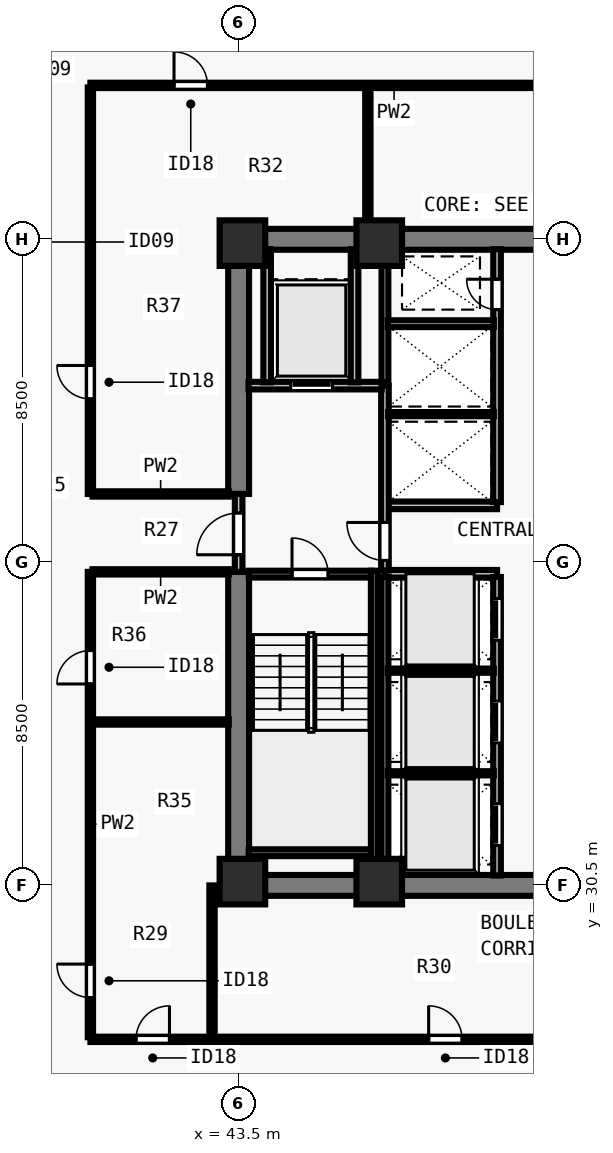
"""IFC4 building model, lengths in metres.
Left out: names, types, materials, properties, quantities, classifications, styles, units other than length and angle.
Written with IfcOpenShell. Run it as: python <this file> out.ifc"""

import sys

from ifc_helpers import new_model, si_unit, direction, frame, frame_2d, origin, origin_2d, place, context, subcontext, project, spatial, rectangle, extrude, element, fill, save


model = new_model("IFC4")
c1 = context("Model", 3, precision=1e-05, world=origin(), true_north=direction((0.0, 1.0)))
c2 = subcontext(c1, "Body", "Model", "MODEL_VIEW")
j1 = project(units=[si_unit("LENGTHUNIT", "METRE"), si_unit("PLANEANGLEUNIT", "RADIAN")], contexts=[c1])
p1 = place(None, origin())
s1 = spatial("IfcSite", under=j1, at=p1, CompositionType="ELEMENT")
p2 = place(p1, origin())
s2 = spatial("IfcBuilding", under=s1, at=p2, CompositionType="ELEMENT")
p3 = place(p2, frame((0.0, 0.0, 90.0)))
s3 = spatial("IfcBuildingStorey", under=s2, at=p3, CompositionType="ELEMENT", Elevation=90.0)
for number, where, z_axis, x_axis in (
    (1, (43.6, 30.6, 0.0), (0.0, 0.0, 1.0), (1.0, 0.0, 0.0)),
    (2, (47.2, 30.6, 0.0), (0.0, 0.0, 1.0), (1.0, 0.0, 0.0)),
    (3, (43.6, 47.4, 0.0), (0.0, 0.0, 1.0), (1.0, 0.0, 0.0)),
    (4, (47.2, 47.4, 0.0), (0.0, 0.0, 1.0), (1.0, 0.0, 0.0)),
):
    element("IfcColumn", number, at=place(p3, frame(where, z_axis=z_axis, x_axis=x_axis)), inside=s3, PredefinedType="COLUMN", context=c2, shape_type="SweptSolid", body=[
        extrude(rectangle(XDim=1.2, YDim=1.2, at=origin_2d()), origin(), (0.0, 0.0, 1.0), 3.5),
    ])
for number, where, z_axis, x_axis in (
    (5, (43.225, 30.5, 0.0), (0.0, 0.0, 1.0), (1.0, 0.0, 0.0)),
    (6, (43.225, 47.5, 0.0), (0.0, 0.0, 1.0), (1.0, 0.0, 0.0)),
):
    element("IfcWall", number, at=place(p3, frame(where, z_axis=z_axis, x_axis=x_axis)), inside=s3, PredefinedType="SHEAR", context=c2, shape_type="SweptSolid", body=[
        extrude(rectangle(XDim=17.55, YDim=0.55, at=frame_2d((8.775, 0.0))), origin(), (0.0, 0.0, 1.0), 3.28),
    ])
p4 = place(p3, frame((43.5, 30.765, 0.0), z_axis=(0.0, 0.0, 1.0), x_axis=(0.0, 1.0, 0.0)))
e7 = element("IfcWall", 7, at=p4, inside=s3, PredefinedType="SHEAR", context=c2, shape_type="SweptSolid", body=[
    extrude(rectangle(XDim=7.985, YDim=0.55, at=frame_2d((3.993, 0.0))), origin(), (0.0, 0.0, 1.0), 3.28),
])
p5 = place(p3, frame((43.5, 40.8, 0.0), z_axis=(0.0, 0.0, 1.0), x_axis=(0.0, 1.0, 0.0)))
e8 = element("IfcWall", 8, at=p5, inside=s3, PredefinedType="SHEAR", context=c2, shape_type="SweptSolid", body=[
    extrude(rectangle(XDim=6.435, YDim=0.55, at=frame_2d((3.218, 0.0))), origin(), (0.0, 0.0, 1.0), 3.28),
])
for number, where, z_axis, x_axis in (
    (9, (47.35, 38.7, 0.0), (0.0, 0.0, 1.0), (1.0, 0.0, 0.0)),
    (10, (47.35, 40.5, 0.0), (0.0, 0.0, 1.0), (1.0, 0.0, 0.0)),
):
    element("IfcWall", number, at=place(p3, frame(where, z_axis=z_axis, x_axis=x_axis)), inside=s3, PredefinedType="SOLIDWALL", context=c2, shape_type="SweptSolid", body=[
        extrude(rectangle(XDim=2.95, YDim=0.2, at=frame_2d((1.475, 0.0))), origin(), (0.0, 0.0, 1.0), 3.28),
    ])
p6 = place(p3, frame((50.3, 30.76, 0.0), z_axis=(0.0, 0.0, 1.0), x_axis=(0.0, 1.0, 0.0)))
e11 = element("IfcWall", 11, at=p6, inside=s3, PredefinedType="SOLIDWALL", context=c2, shape_type="SweptSolid", body=[
    extrude(rectangle(XDim=7.855, YDim=0.2, at=frame_2d((3.927, 0.0))), origin(), (0.0, 0.0, 1.0), 3.28),
])
p7 = place(p6, frame((0.79, 0.0, 0.0)))
e12 = element("IfcOpeningElement", 12, at=p7, cuts=e11, PredefinedType="OPENING", context=c2, shape_type="SweptSolid", body=[
    extrude(rectangle(XDim=1.1, YDim=2.2, at=frame_2d((0.55, 1.1))), frame((0.0, 0.11, 0.0), z_axis=(0.0, -1.0, 0.0), x_axis=(1.0, 0.0, 0.0)), (0.0, 0.0, 1.0), 0.22),
])
p8 = place(p6, frame((3.49, 0.0, 0.0)))
e13 = element("IfcOpeningElement", 13, at=p8, cuts=e11, PredefinedType="OPENING", context=c2, shape_type="SweptSolid", body=[
    extrude(rectangle(XDim=1.1, YDim=2.2, at=frame_2d((0.55, 1.1))), frame((0.0, 0.11, 0.0), z_axis=(0.0, -1.0, 0.0), x_axis=(1.0, 0.0, 0.0)), (0.0, 0.0, 1.0), 0.22),
])
p9 = place(p6, frame((6.19, 0.0, 0.0)))
e14 = element("IfcOpeningElement", 14, at=p9, cuts=e11, PredefinedType="OPENING", context=c2, shape_type="SweptSolid", body=[
    extrude(rectangle(XDim=1.1, YDim=2.2, at=frame_2d((0.55, 1.1))), frame((0.0, 0.11, 0.0), z_axis=(0.0, -1.0, 0.0), x_axis=(1.0, 0.0, 0.0)), (0.0, 0.0, 1.0), 0.22),
])
p10 = place(p3, frame((50.3, 40.585, 0.0), z_axis=(0.0, 0.0, 1.0), x_axis=(0.0, 1.0, 0.0)))
e15 = element("IfcWall", 15, at=p10, inside=s3, PredefinedType="SOLIDWALL", context=c2, shape_type="SweptSolid", body=[
    extrude(rectangle(XDim=6.655, YDim=0.2, at=frame_2d((3.328, 0.0))), origin(), (0.0, 0.0, 1.0), 3.28),
])
p11 = place(p10, frame((5.065, 0.0, 0.0)))
e16 = element("IfcOpeningElement", 16, at=p11, cuts=e15, PredefinedType="OPENING", context=c2, shape_type="SweptSolid", body=[
    extrude(rectangle(XDim=0.8, YDim=2.08, at=frame_2d((0.4, 1.04))), frame((0.0, 0.11, 0.0), z_axis=(0.0, -1.0, 0.0), x_axis=(1.0, 0.0, 0.0)), (0.0, 0.0, 1.0), 0.22),
])
p12 = place(p3, frame((43.5, 38.75, 0.0), z_axis=(0.0, 0.0, 1.0), x_axis=(0.0, 1.0, 0.0)))
e17 = element("IfcWall", 17, at=p12, inside=s3, PredefinedType="SOLIDWALL", context=c2, shape_type="SweptSolid", body=[
    extrude(rectangle(XDim=2.05, YDim=0.2, at=frame_2d((1.025, 0.0))), origin(), (0.0, 0.0, 1.0), 3.28),
])
p13 = place(p12, frame((0.45, 0.0, 0.0)))
e18 = element("IfcOpeningElement", 18, at=p13, cuts=e17, PredefinedType="OPENING", context=c2, shape_type="SweptSolid", body=[
    extrude(rectangle(XDim=1.1, YDim=2.15, at=frame_2d((0.55, 1.075))), frame((0.0, 0.11, 0.0), z_axis=(0.0, -1.0, 0.0), x_axis=(1.0, 0.0, 0.0)), (0.0, 0.0, 1.0), 0.22),
])
p14 = place(p3, frame((47.35, 38.785, 0.0), z_axis=(0.0, 0.0, 1.0), x_axis=(0.0, 1.0, 0.0)))
e19 = element("IfcWall", 19, at=p14, inside=s3, PredefinedType="SOLIDWALL", context=c2, shape_type="SweptSolid", body=[
    extrude(rectangle(XDim=4.865, YDim=0.2, at=frame_2d((2.433, 0.0))), origin(), (0.0, 0.0, 1.0), 3.28),
])
p15 = place(p14, frame((0.265, 0.0, 0.0)))
e20 = element("IfcOpeningElement", 20, at=p15, cuts=e19, PredefinedType="OPENING", context=c2, shape_type="SweptSolid", body=[
    extrude(rectangle(XDim=1.0, YDim=2.15, at=frame_2d((0.5, 1.075))), frame((0.0, 0.11, 0.0), z_axis=(0.0, -1.0, 0.0), x_axis=(1.0, 0.0, 0.0)), (0.0, 0.0, 1.0), 0.22),
])
p16 = place(p3, frame((43.76, 43.65, 0.0), z_axis=(0.0, 0.0, 1.0), x_axis=(1.0, 0.0, 0.0)))
e21 = element("IfcWall", 21, at=p16, inside=s3, PredefinedType="SOLIDWALL", context=c2, shape_type="SweptSolid", body=[
    extrude(rectangle(XDim=3.505, YDim=0.2, at=frame_2d((1.752, 0.0))), origin(), (0.0, 0.0, 1.0), 3.28),
])
p17 = place(p16, frame((1.11, 0.0, 0.0)))
e22 = element("IfcOpeningElement", 22, at=p17, cuts=e21, PredefinedType="OPENING", context=c2, shape_type="SweptSolid", body=[
    extrude(rectangle(XDim=1.1, YDim=2.2, at=frame_2d((0.55, 1.1))), frame((0.0, 0.11, 0.0), z_axis=(0.0, -1.0, 0.0), x_axis=(1.0, 0.0, 0.0)), (0.0, 0.0, 1.0), 0.22),
])
for number, where, z_axis, x_axis in (
    (23, (46.55, 43.735, 0.0), (0.0, 0.0, 1.0), (0.0, 1.0, 0.0)),
    (24, (44.25, 43.735, 0.0), (0.0, 0.0, 1.0), (0.0, 1.0, 0.0)),
):
    element("IfcWall", number, at=place(p3, frame(where, z_axis=z_axis, x_axis=x_axis)), inside=s3, PredefinedType="SOLIDWALL", context=c2, shape_type="SweptSolid", body=[
        extrude(rectangle(XDim=3.505, YDim=0.2, at=frame_2d((1.752, 0.0))), origin(), (0.0, 0.0, 1.0), 3.28),
    ])
p18 = place(p3, frame((47.35, 30.76, 0.0), z_axis=(0.0, 0.0, 1.0), x_axis=(0.0, 1.0, 0.0)))
e25 = element("IfcWall", 25, at=p18, inside=s3, PredefinedType="SOLIDWALL", context=c2, shape_type="SweptSolid", body=[
    extrude(rectangle(XDim=7.855, YDim=0.18, at=frame_2d((3.927, 0.0))), origin(), (0.0, 0.0, 1.0), 3.28),
])
for number, where, z_axis, x_axis in (
    (26, (47.425, 33.45, 0.0), (0.0, 0.0, 1.0), (1.0, 0.0, 0.0)),
    (27, (47.425, 36.15, 0.0), (0.0, 0.0, 1.0), (1.0, 0.0, 0.0)),
):
    element("IfcWall", number, at=place(p3, frame(where, z_axis=z_axis, x_axis=x_axis)), inside=s3, PredefinedType="PARTITIONING", context=c2, shape_type="SweptSolid", body=[
        extrude(rectangle(XDim=2.79, YDim=0.11, at=frame_2d((1.395, 0.0))), origin(), (0.0, 0.0, 1.0), 3.28),
    ])
p19 = place(p3, frame((47.35, 43.735, 0.0), z_axis=(0.0, 0.0, 1.0), x_axis=(0.0, 1.0, 0.0)))
e28 = element("IfcWall", 28, at=p19, inside=s3, PredefinedType="SOLIDWALL", context=c2, shape_type="SweptSolid", body=[
    extrude(rectangle(XDim=3.505, YDim=0.18, at=frame_2d((1.752, 0.0))), origin(), (0.0, 0.0, 1.0), 3.28),
])
p20 = place(p3, frame((47.435, 42.9, 0.0), z_axis=(0.0, 0.0, 1.0), x_axis=(1.0, 0.0, 0.0)))
e29 = element("IfcWall", 29, at=p20, inside=s3, PredefinedType="PARTITIONING", context=c2, shape_type="SweptSolid", body=[
    extrude(rectangle(XDim=2.78, YDim=0.11, at=frame_2d((1.39, 0.0))), origin(), (0.0, 0.0, 1.0), 3.28),
])
p21 = place(p3, frame((47.425, 45.28, 0.0), z_axis=(0.0, 0.0, 1.0), x_axis=(1.0, 0.0, 0.0)))
e30 = element("IfcWall", 30, at=p21, inside=s3, PredefinedType="SOLIDWALL", context=c2, shape_type="SweptSolid", body=[
    extrude(rectangle(XDim=2.79, YDim=0.18, at=frame_2d((1.395, 0.0))), origin(), (0.0, 0.0, 1.0), 3.28),
])
p22 = place(p3, frame((39.6, 26.45, 0.0), z_axis=(0.0, 0.0, 1.0), x_axis=(1.0, 0.0, 0.0)))
e31 = element("IfcWall", 31, at=p22, inside=s3, PredefinedType="PARTITIONING", context=c2, shape_type="SweptSolid", body=[
    extrude(rectangle(XDim=24.8, YDim=0.14, at=frame_2d((12.4, 0.0))), origin(), (0.0, 0.0, 1.0), 3.28),
])
p23 = place(p22, frame((1.2, 0.0, 0.0)))
e32 = element("IfcOpeningElement", 32, at=p23, cuts=e31, PredefinedType="OPENING", context=c2, shape_type="SweptSolid", body=[
    extrude(rectangle(XDim=0.88, YDim=2.1, at=frame_2d((0.44, 1.05))), frame((0.0, 0.08, 0.0), z_axis=(0.0, -1.0, 0.0), x_axis=(1.0, 0.0, 0.0)), (0.0, 0.0, 1.0), 0.16),
])
p24 = place(p22, frame((8.9, 0.0, 0.0)))
e33 = element("IfcOpeningElement", 33, at=p24, cuts=e31, PredefinedType="OPENING", context=c2, shape_type="SweptSolid", body=[
    extrude(rectangle(XDim=0.88, YDim=2.1, at=frame_2d((0.44, 1.05))), frame((0.0, 0.08, 0.0), z_axis=(0.0, -1.0, 0.0), x_axis=(1.0, 0.0, 0.0)), (0.0, 0.0, 1.0), 0.16),
])
p25 = place(p22, frame((19.4, 0.0, 0.0)))
e34 = element("IfcOpeningElement", 34, at=p25, cuts=e31, PredefinedType="OPENING", context=c2, shape_type="SweptSolid", body=[
    extrude(rectangle(XDim=0.88, YDim=2.1, at=frame_2d((0.44, 1.05))), frame((0.0, 0.08, 0.0), z_axis=(0.0, -1.0, 0.0), x_axis=(1.0, 0.0, 0.0)), (0.0, 0.0, 1.0), 0.16),
])
p26 = place(p3, frame((39.6, 51.55, 0.0), z_axis=(0.0, 0.0, 1.0), x_axis=(1.0, 0.0, 0.0)))
e35 = element("IfcWall", 35, at=p26, inside=s3, PredefinedType="PARTITIONING", context=c2, shape_type="SweptSolid", body=[
    extrude(rectangle(XDim=24.8, YDim=0.14, at=frame_2d((12.4, 0.0))), origin(), (0.0, 0.0, 1.0), 3.28),
])
p27 = place(p26, frame((2.2, 0.0, 0.0)))
e36 = element("IfcOpeningElement", 36, at=p27, cuts=e35, PredefinedType="OPENING", context=c2, shape_type="SweptSolid", body=[
    extrude(rectangle(XDim=0.88, YDim=2.1, at=frame_2d((0.44, 1.05))), frame((0.0, 0.08, 0.0), z_axis=(0.0, -1.0, 0.0), x_axis=(1.0, 0.0, 0.0)), (0.0, 0.0, 1.0), 0.16),
])
p28 = place(p26, frame((12.9, 0.0, 0.0)))
e37 = element("IfcOpeningElement", 37, at=p28, cuts=e35, PredefinedType="OPENING", context=c2, shape_type="SweptSolid", body=[
    extrude(rectangle(XDim=0.88, YDim=2.1, at=frame_2d((0.44, 1.05))), frame((0.0, 0.08, 0.0), z_axis=(0.0, -1.0, 0.0), x_axis=(1.0, 0.0, 0.0)), (0.0, 0.0, 1.0), 0.16),
])
p29 = place(p26, frame((22.4, 0.0, 0.0)))
e38 = element("IfcOpeningElement", 38, at=p29, cuts=e35, PredefinedType="OPENING", context=c2, shape_type="SweptSolid", body=[
    extrude(rectangle(XDim=0.88, YDim=2.1, at=frame_2d((0.44, 1.05))), frame((0.0, 0.08, 0.0), z_axis=(0.0, -1.0, 0.0), x_axis=(1.0, 0.0, 0.0)), (0.0, 0.0, 1.0), 0.16),
])
p30 = place(p3, frame((39.6, 26.505, 0.0), z_axis=(0.0, 0.0, 1.0), x_axis=(0.0, 1.0, 0.0)))
e39 = element("IfcWall", 39, at=p30, inside=s3, PredefinedType="PARTITIONING", context=c2, shape_type="SweptSolid", body=[
    extrude(rectangle(XDim=12.245, YDim=0.14, at=frame_2d((6.123, 0.0))), origin(), (0.0, 0.0, 1.0), 3.28),
])
p31 = place(p30, frame((1.045, 0.0, 0.0)))
e40 = element("IfcOpeningElement", 40, at=p31, cuts=e39, PredefinedType="OPENING", context=c2, shape_type="SweptSolid", body=[
    extrude(rectangle(XDim=0.88, YDim=2.1, at=frame_2d((0.44, 1.05))), frame((0.0, 0.08, 0.0), z_axis=(0.0, -1.0, 0.0), x_axis=(1.0, 0.0, 0.0)), (0.0, 0.0, 1.0), 0.16),
])
p32 = place(p30, frame((9.295, 0.0, 0.0)))
e41 = element("IfcOpeningElement", 41, at=p32, cuts=e39, PredefinedType="OPENING", context=c2, shape_type="SweptSolid", body=[
    extrude(rectangle(XDim=0.88, YDim=2.1, at=frame_2d((0.44, 1.05))), frame((0.0, 0.08, 0.0), z_axis=(0.0, -1.0, 0.0), x_axis=(1.0, 0.0, 0.0)), (0.0, 0.0, 1.0), 0.16),
])
p33 = place(p3, frame((39.6, 40.8, 0.0), z_axis=(0.0, 0.0, 1.0), x_axis=(0.0, 1.0, 0.0)))
e42 = element("IfcWall", 42, at=p33, inside=s3, PredefinedType="PARTITIONING", context=c2, shape_type="SweptSolid", body=[
    extrude(rectangle(XDim=10.695, YDim=0.14, at=frame_2d((5.348, 0.0))), origin(), (0.0, 0.0, 1.0), 3.28),
])
p34 = place(p33, frame((2.5, 0.0, 0.0)))
e43 = element("IfcOpeningElement", 43, at=p34, cuts=e42, PredefinedType="OPENING", context=c2, shape_type="SweptSolid", body=[
    extrude(rectangle(XDim=0.88, YDim=2.1, at=frame_2d((0.44, 1.05))), frame((0.0, 0.08, 0.0), z_axis=(0.0, -1.0, 0.0), x_axis=(1.0, 0.0, 0.0)), (0.0, 0.0, 1.0), 0.16),
])
for number, where, z_axis, x_axis in (
    (44, (39.655, 38.75, 0.0), (0.0, 0.0, 1.0), (1.0, 0.0, 0.0)),
    (45, (39.655, 40.8, 0.0), (0.0, 0.0, 1.0), (1.0, 0.0, 0.0)),
):
    element("IfcWall", number, at=place(p3, frame(where, z_axis=z_axis, x_axis=x_axis)), inside=s3, PredefinedType="PARTITIONING", context=c2, shape_type="SweptSolid", body=[
        extrude(rectangle(XDim=3.585, YDim=0.14, at=frame_2d((1.792, 0.0))), origin(), (0.0, 0.0, 1.0), 3.28),
    ])
p35 = place(p3, frame((42.8, 26.505, 0.0), z_axis=(0.0, 0.0, 1.0), x_axis=(0.0, 1.0, 0.0)))
e46 = element("IfcWall", 46, at=p35, inside=s3, PredefinedType="PARTITIONING", context=c2, shape_type="SweptSolid", body=[
    extrude(rectangle(XDim=3.995, YDim=0.14, at=frame_2d((1.998, 0.0))), origin(), (0.0, 0.0, 1.0), 2.439),
])
p36 = place(p3, frame((46.9, 47.76, 0.0), z_axis=(0.0, 0.0, 1.0), x_axis=(0.0, 1.0, 0.0)))
e47 = element("IfcWall", 47, at=p36, inside=s3, PredefinedType="PARTITIONING", context=c2, shape_type="SweptSolid", body=[
    extrude(rectangle(XDim=3.735, YDim=0.14, at=frame_2d((1.868, 0.0))), origin(), (0.0, 0.0, 1.0), 3.28),
])
p37 = place(p3, frame((39.655, 34.8, 0.0), z_axis=(0.0, 0.0, 1.0), x_axis=(1.0, 0.0, 0.0)))
e48 = element("IfcWall", 48, at=p37, inside=s3, PredefinedType="PARTITIONING", context=c2, shape_type="SweptSolid", body=[
    extrude(rectangle(XDim=3.585, YDim=0.14, at=frame_2d((1.792, 0.0))), origin(), (0.0, 0.0, 1.0), 3.28),
])
p38 = place(p3, frame((43.765, 38.69, 0.0), z_axis=(0.0, 0.0, 1.0), x_axis=(1.0, 0.0, 0.0)))
e49 = element("IfcWall", 49, at=p38, inside=s3, PredefinedType="SOLIDWALL", context=c2, shape_type="SweptSolid", body=[
    extrude(rectangle(XDim=3.23, YDim=0.18, at=frame_2d((1.615, 0.0))), origin(), (0.0, 0.0, 1.0), 3.28),
])
p39 = place(p38, frame((1.14, 0.0, 0.0)))
e50 = element("IfcOpeningElement", 50, at=p39, cuts=e49, PredefinedType="OPENING", context=c2, shape_type="SweptSolid", body=[
    extrude(rectangle(XDim=0.95, YDim=2.15, at=frame_2d((0.475, 1.075))), frame((0.0, 0.1, 0.0), z_axis=(0.0, -1.0, 0.0), x_axis=(1.0, 0.0, 0.0)), (0.0, 0.0, 1.0), 0.2),
])
p40 = place(p3, frame((43.765, 31.36, 0.0), z_axis=(0.0, 0.0, 1.0), x_axis=(1.0, 0.0, 0.0)))
e51 = element("IfcWall", 51, at=p40, inside=s3, PredefinedType="SOLIDWALL", context=c2, shape_type="SweptSolid", body=[
    extrude(rectangle(XDim=3.23, YDim=0.18, at=frame_2d((1.615, 0.0))), origin(), (0.0, 0.0, 1.0), 3.28),
])
p41 = place(p3, frame((47.07, 38.78, 0.0), z_axis=(0.0, 0.0, 1.0), x_axis=(0.0, -1.0, 0.0)))
e52 = element("IfcWall", 52, at=p41, inside=s3, PredefinedType="SOLIDWALL", context=c2, shape_type="SweptSolid", body=[
    extrude(rectangle(XDim=8.017, YDim=0.18, at=frame_2d((4.009, 0.0))), origin(), (0.0, 0.0, 1.0), 3.28),
])
p42 = place(p13, origin())
e53 = element("IfcDoor", 53, at=p42, inside=s3, OperationType="SINGLE_SWING_LEFT", PredefinedType="DOOR", context=c2, shape_type="SweptSolid", body=[
    extrude(rectangle(XDim=1.1, YDim=2.15, at=frame_2d((0.55, 1.075))), frame((0.0, 0.025, 0.0), z_axis=(0.0, -1.0, 0.0), x_axis=(1.0, 0.0, 0.0)), (0.0, 0.0, 1.0), 0.05),
])
fill(e18, e53)
p43 = place(p15, origin())
e54 = element("IfcDoor", 54, at=p43, inside=s3, OperationType="SINGLE_SWING_RIGHT", PredefinedType="DOOR", context=c2, shape_type="SweptSolid", body=[
    extrude(rectangle(XDim=1.0, YDim=2.15, at=frame_2d((0.5, 1.075))), frame((0.0, 0.025, 0.0), z_axis=(0.0, -1.0, 0.0), x_axis=(1.0, 0.0, 0.0)), (0.0, 0.0, 1.0), 0.05),
])
fill(e20, e54)
p44 = place(p17, origin())
e55 = element("IfcDoor", 55, at=p44, inside=s3, OperationType="SLIDING_TO_LEFT", PredefinedType="DOOR", context=c2, shape_type="SweptSolid", body=[
    extrude(rectangle(XDim=1.1, YDim=2.2, at=frame_2d((0.55, 1.1))), frame((0.0, 0.025, 0.0), z_axis=(0.0, -1.0, 0.0), x_axis=(1.0, 0.0, 0.0)), (0.0, 0.0, 1.0), 0.05),
])
fill(e22, e55)
p45 = place(p7, origin())
e56 = element("IfcDoor", 56, at=p45, inside=s3, OperationType="SLIDING_TO_LEFT", PredefinedType="DOOR", context=c2, shape_type="SweptSolid", body=[
    extrude(rectangle(XDim=1.1, YDim=2.2, at=frame_2d((0.55, 1.1))), frame((0.0, 0.025, 0.0), z_axis=(0.0, -1.0, 0.0), x_axis=(1.0, 0.0, 0.0)), (0.0, 0.0, 1.0), 0.05),
])
fill(e12, e56)
p46 = place(p8, origin())
e57 = element("IfcDoor", 57, at=p46, inside=s3, OperationType="SLIDING_TO_LEFT", PredefinedType="DOOR", context=c2, shape_type="SweptSolid", body=[
    extrude(rectangle(XDim=1.1, YDim=2.2, at=frame_2d((0.55, 1.1))), frame((0.0, 0.025, 0.0), z_axis=(0.0, -1.0, 0.0), x_axis=(1.0, 0.0, 0.0)), (0.0, 0.0, 1.0), 0.05),
])
fill(e13, e57)
p47 = place(p9, origin())
e58 = element("IfcDoor", 58, at=p47, inside=s3, OperationType="SLIDING_TO_LEFT", PredefinedType="DOOR", context=c2, shape_type="SweptSolid", body=[
    extrude(rectangle(XDim=1.1, YDim=2.2, at=frame_2d((0.55, 1.1))), frame((0.0, 0.025, 0.0), z_axis=(0.0, -1.0, 0.0), x_axis=(1.0, 0.0, 0.0)), (0.0, 0.0, 1.0), 0.05),
])
fill(e14, e58)
p48 = place(p11, origin())
e59 = element("IfcDoor", 59, at=p48, inside=s3, OperationType="SINGLE_SWING_RIGHT", PredefinedType="DOOR", context=c2, shape_type="SweptSolid", body=[
    extrude(rectangle(XDim=0.8, YDim=2.08, at=frame_2d((0.4, 1.04))), frame((0.0, 0.025, 0.0), z_axis=(0.0, -1.0, 0.0), x_axis=(1.0, 0.0, 0.0)), (0.0, 0.0, 1.0), 0.05),
])
fill(e16, e59)
p49 = place(p23, origin())
e60 = element("IfcDoor", 60, at=p49, inside=s3, OperationType="SINGLE_SWING_RIGHT", PredefinedType="DOOR", context=c2, shape_type="SweptSolid", body=[
    extrude(rectangle(XDim=0.88, YDim=2.1, at=frame_2d((0.44, 1.05))), frame((0.0, 0.025, 0.0), z_axis=(0.0, -1.0, 0.0), x_axis=(1.0, 0.0, 0.0)), (0.0, 0.0, 1.0), 0.05),
])
fill(e32, e60)
p50 = place(p24, origin())
e61 = element("IfcDoor", 61, at=p50, inside=s3, OperationType="SINGLE_SWING_LEFT", PredefinedType="DOOR", context=c2, shape_type="SweptSolid", body=[
    extrude(rectangle(XDim=0.88, YDim=2.1, at=frame_2d((0.44, 1.05))), frame((0.0, 0.025, 0.0), z_axis=(0.0, -1.0, 0.0), x_axis=(1.0, 0.0, 0.0)), (0.0, 0.0, 1.0), 0.05),
])
fill(e33, e61)
p51 = place(p27, origin())
e62 = element("IfcDoor", 62, at=p51, inside=s3, OperationType="SINGLE_SWING_LEFT", PredefinedType="DOOR", context=c2, shape_type="SweptSolid", body=[
    extrude(rectangle(XDim=0.88, YDim=2.1, at=frame_2d((0.44, 1.05))), frame((0.0, 0.025, 0.0), z_axis=(0.0, -1.0, 0.0), x_axis=(1.0, 0.0, 0.0)), (0.0, 0.0, 1.0), 0.05),
])
fill(e36, e62)
p52 = place(p31, origin())
e63 = element("IfcDoor", 63, at=p52, inside=s3, OperationType="SINGLE_SWING_RIGHT", PredefinedType="DOOR", context=c2, shape_type="SweptSolid", body=[
    extrude(rectangle(XDim=0.88, YDim=2.1, at=frame_2d((0.44, 1.05))), frame((0.0, 0.025, 0.0), z_axis=(0.0, -1.0, 0.0), x_axis=(1.0, 0.0, 0.0)), (0.0, 0.0, 1.0), 0.05),
])
fill(e40, e63)
p53 = place(p32, origin())
e64 = element("IfcDoor", 64, at=p53, inside=s3, OperationType="SINGLE_SWING_LEFT", PredefinedType="DOOR", context=c2, shape_type="SweptSolid", body=[
    extrude(rectangle(XDim=0.88, YDim=2.1, at=frame_2d((0.44, 1.05))), frame((0.0, 0.025, 0.0), z_axis=(0.0, -1.0, 0.0), x_axis=(1.0, 0.0, 0.0)), (0.0, 0.0, 1.0), 0.05),
])
fill(e41, e64)
p54 = place(p34, origin())
e65 = element("IfcDoor", 65, at=p54, inside=s3, OperationType="SINGLE_SWING_RIGHT", PredefinedType="DOOR", context=c2, shape_type="SweptSolid", body=[
    extrude(rectangle(XDim=0.88, YDim=2.1, at=frame_2d((0.44, 1.05))), frame((0.0, 0.025, 0.0), z_axis=(0.0, -1.0, 0.0), x_axis=(1.0, 0.0, 0.0)), (0.0, 0.0, 1.0), 0.05),
])
fill(e43, e65)
p55 = place(p39, origin())
e66 = element("IfcDoor", 66, at=p55, inside=s3, OperationType="SINGLE_SWING_LEFT", PredefinedType="DOOR", context=c2, shape_type="SweptSolid", body=[
    extrude(rectangle(XDim=0.95, YDim=2.15, at=frame_2d((0.475, 1.075))), frame((0.0, 0.025, 0.0), z_axis=(0.0, -1.0, 0.0), x_axis=(1.0, 0.0, 0.0)), (0.0, 0.0, 1.0), 0.05),
])
fill(e50, e66)
save(model, sys.argv[1])
